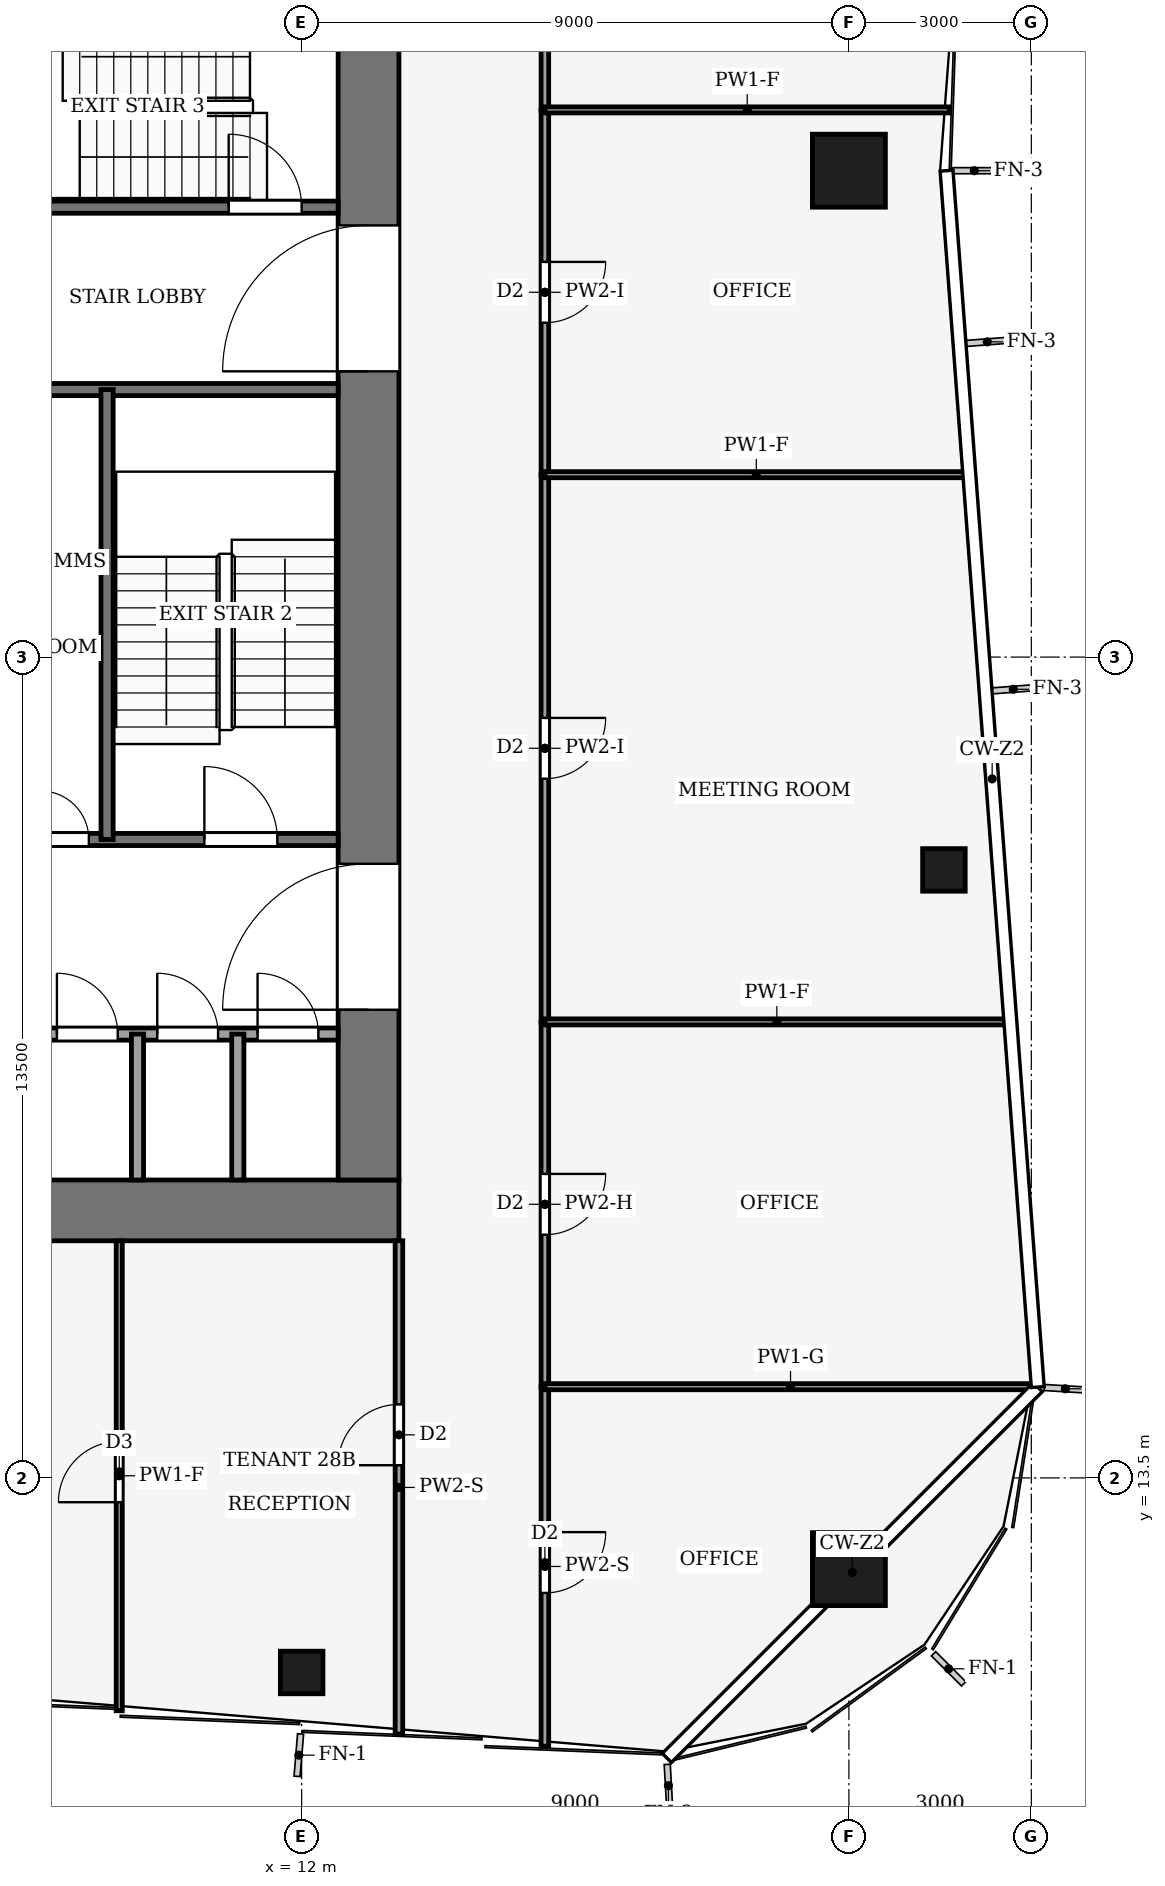
"""IFC4 building model, lengths in metres.
Left out: names, types, materials, properties, quantities, classifications, styles, units other than length and angle.
Written with IfcOpenShell. Run it as: python <this file> out.ifc"""

import sys

from ifc_helpers import new_model, si_unit, direction, frame, frame_2d, origin, origin_2d, place, context, subcontext, project, spatial, rectangle, hollow_rectangle, extrude, element, fill, save


model = new_model("IFC4")
c1 = context("Model", 3, precision=1e-05, world=origin(), true_north=direction((0.0, 1.0)))
c2 = subcontext(c1, "Body", "Model", "MODEL_VIEW")
j1 = project(units=[si_unit("LENGTHUNIT", "METRE"), si_unit("PLANEANGLEUNIT", "RADIAN")], contexts=[c1])
p1 = place(None, origin())
s1 = spatial("IfcSite", under=j1, at=p1, CompositionType="ELEMENT")
p2 = place(p1, origin())
s2 = spatial("IfcBuilding", under=s1, at=p2, CompositionType="ELEMENT")
p3 = place(p2, frame((0.0, 0.0, 126.0)))
s3 = spatial("IfcBuildingStorey", under=s2, at=p3, CompositionType="ELEMENT", Elevation=126.0)
p4 = place(p3, frame((-13.6, 17.9, -0.13), z_axis=(0.0, 0.0, 1.0), x_axis=(1.0, 0.0, 0.0)))
e1 = element("IfcWall", 1, at=p4, inside=s3, PredefinedType="SHEAR", context=c2, shape_type="SweptSolid", body=[
    extrude(rectangle(XDim=27.2, YDim=1.0, at=frame_2d((13.6, 0.0))), origin(), (0.0, 0.0, 1.0), 4.0),
])
p5 = place(p3, frame((13.1, 18.4, -0.13), z_axis=(0.0, 0.0, 1.0), x_axis=(0.0, 1.0, 0.0)))
e2 = element("IfcWall", 2, at=p5, inside=s3, PredefinedType="SHEAR", context=c2, shape_type="SweptSolid", body=[
    extrude(rectangle(XDim=19.2, YDim=1.0, at=frame_2d((9.6, 0.0))), origin(), (0.0, 0.0, 1.0), 4.0),
])
p6 = place(p5, frame((2.8, 0.0, 0.13)))
e3 = element("IfcOpeningElement", 3, at=p6, cuts=e2, PredefinedType="OPENING", context=c2, shape_type="SweptSolid", body=[
    extrude(rectangle(XDim=2.4, YDim=2.4, at=frame_2d((1.2, 1.2))), frame((0.0, 0.51, 0.0), z_axis=(0.0, -1.0, 0.0), x_axis=(1.0, 0.0, 0.0)), (0.0, 0.0, 1.0), 1.02),
])
p7 = place(p5, frame((13.3, 0.0, 0.13)))
e4 = element("IfcOpeningElement", 4, at=p7, cuts=e2, PredefinedType="OPENING", context=c2, shape_type="SweptSolid", body=[
    extrude(rectangle(XDim=2.4, YDim=2.4, at=frame_2d((1.2, 1.2))), frame((0.0, 0.51, 0.0), z_axis=(0.0, -1.0, 0.0), x_axis=(1.0, 0.0, 0.0)), (0.0, 0.0, 1.0), 1.02),
])
for number, where, z_axis, x_axis in (
    (5, (21.0, 35.0, 0.0), (0.0, 0.0, 1.0), (1.0, 0.0, 0.0)),
    (6, (21.0, 12.0, 0.0), (0.0, 0.0, 1.0), (1.0, 0.0, 0.0)),
):
    element("IfcColumn", number, at=place(p3, frame(where, z_axis=z_axis, x_axis=x_axis)), inside=s3, PredefinedType="COLUMN", context=c2, shape_type="SweptSolid", body=[
        extrude(hollow_rectangle(XDim=1.2, YDim=1.2, WallThickness=0.07, at=origin_2d()), origin(), (0.0, 0.0, 1.0), 4.0),
    ])
for number, where, z_axis, x_axis in (
    (7, (12.0, 10.3, 0.0), (0.0, 0.0, 1.0), (1.0, 0.0, 0.0)),
    (8, (22.562, 23.5, 0.0), (0.0, 0.0, 1.0), (1.0, 0.0, 0.0)),
):
    element("IfcColumn", number, at=place(p3, frame(where, z_axis=z_axis, x_axis=x_axis)), inside=s3, PredefinedType="COLUMN", context=c2, shape_type="SweptSolid", body=[
        extrude(hollow_rectangle(XDim=0.7, YDim=0.7, WallThickness=0.03, at=origin_2d()), origin(), (0.0, 0.0, 1.0), 4.0),
    ])
p8 = place(p3, frame((6.0, 20.8, 0.0), z_axis=(0.0, 0.0, 1.0), x_axis=(1.0, 0.0, 0.0)))
e9 = element("IfcWall", 9, at=p8, inside=s3, PredefinedType="PARTITIONING", context=c2, shape_type="SweptSolid", body=[
    extrude(rectangle(XDim=6.6, YDim=0.2, at=frame_2d((3.3, 0.0))), origin(), (0.0, 0.0, 1.0), 3.87),
])
p9 = place(p8, frame((0.325, 0.0, 0.0)))
e10 = element("IfcOpeningElement", 10, at=p9, cuts=e9, PredefinedType="OPENING", context=c2, shape_type="SweptSolid", body=[
    extrude(rectangle(XDim=1.0, YDim=2.1, at=frame_2d((0.5, 1.05))), frame((0.0, 0.11, 0.0), z_axis=(0.0, -1.0, 0.0), x_axis=(1.0, 0.0, 0.0)), (0.0, 0.0, 1.0), 0.22),
])
p10 = place(p8, frame((1.975, 0.0, 0.0)))
e11 = element("IfcOpeningElement", 11, at=p10, cuts=e9, PredefinedType="OPENING", context=c2, shape_type="SweptSolid", body=[
    extrude(rectangle(XDim=1.0, YDim=2.1, at=frame_2d((0.5, 1.05))), frame((0.0, 0.11, 0.0), z_axis=(0.0, -1.0, 0.0), x_axis=(1.0, 0.0, 0.0)), (0.0, 0.0, 1.0), 0.22),
])
p11 = place(p8, frame((3.625, 0.0, 0.0)))
e12 = element("IfcOpeningElement", 12, at=p11, cuts=e9, PredefinedType="OPENING", context=c2, shape_type="SweptSolid", body=[
    extrude(rectangle(XDim=1.0, YDim=2.1, at=frame_2d((0.5, 1.05))), frame((0.0, 0.11, 0.0), z_axis=(0.0, -1.0, 0.0), x_axis=(1.0, 0.0, 0.0)), (0.0, 0.0, 1.0), 0.22),
])
p12 = place(p8, frame((5.275, 0.0, 0.0)))
e13 = element("IfcOpeningElement", 13, at=p12, cuts=e9, PredefinedType="OPENING", context=c2, shape_type="SweptSolid", body=[
    extrude(rectangle(XDim=1.0, YDim=2.1, at=frame_2d((0.5, 1.05))), frame((0.0, 0.11, 0.0), z_axis=(0.0, -1.0, 0.0), x_axis=(1.0, 0.0, 0.0)), (0.0, 0.0, 1.0), 0.22),
])
p13 = place(p3, frame((6.0, 24.0, 0.0), z_axis=(0.0, 0.0, 1.0), x_axis=(1.0, 0.0, 0.0)))
e14 = element("IfcWall", 14, at=p13, inside=s3, PredefinedType="PARTITIONING", context=c2, shape_type="SweptSolid", body=[
    extrude(rectangle(XDim=6.6, YDim=0.2, at=frame_2d((3.3, 0.0))), origin(), (0.0, 0.0, 1.0), 3.87),
])
p14 = place(p13, frame((0.3, 0.0, 0.0)))
e15 = element("IfcOpeningElement", 15, at=p14, cuts=e14, PredefinedType="OPENING", context=c2, shape_type="SweptSolid", body=[
    extrude(rectangle(XDim=0.8, YDim=2.1, at=frame_2d((0.4, 1.05))), frame((0.0, 0.11, 0.0), z_axis=(0.0, -1.0, 0.0), x_axis=(1.0, 0.0, 0.0)), (0.0, 0.0, 1.0), 0.22),
])
p15 = place(p13, frame((1.7, 0.0, 0.0)))
e16 = element("IfcOpeningElement", 16, at=p15, cuts=e14, PredefinedType="OPENING", context=c2, shape_type="SweptSolid", body=[
    extrude(rectangle(XDim=0.8, YDim=2.1, at=frame_2d((0.4, 1.05))), frame((0.0, 0.11, 0.0), z_axis=(0.0, -1.0, 0.0), x_axis=(1.0, 0.0, 0.0)), (0.0, 0.0, 1.0), 0.22),
])
p16 = place(p13, frame((4.4, 0.0, 0.0)))
e17 = element("IfcOpeningElement", 17, at=p16, cuts=e14, PredefinedType="OPENING", context=c2, shape_type="SweptSolid", body=[
    extrude(rectangle(XDim=1.2, YDim=2.2, at=frame_2d((0.6, 1.1))), frame((0.0, 0.11, 0.0), z_axis=(0.0, -1.0, 0.0), x_axis=(1.0, 0.0, 0.0)), (0.0, 0.0, 1.0), 0.22),
])
p17 = place(p3, frame((6.0, 31.4, 0.0), z_axis=(0.0, 0.0, 1.0), x_axis=(1.0, 0.0, 0.0)))
e18 = element("IfcWall", 18, at=p17, inside=s3, PredefinedType="PARTITIONING", context=c2, shape_type="SweptSolid", body=[
    extrude(rectangle(XDim=6.6, YDim=0.2, at=frame_2d((3.3, 0.0))), origin(), (0.0, 0.0, 1.0), 3.87),
])
p18 = place(p3, frame((6.0, 34.4, 0.0), z_axis=(0.0, 0.0, 1.0), x_axis=(1.0, 0.0, 0.0)))
e19 = element("IfcWall", 19, at=p18, inside=s3, PredefinedType="PARTITIONING", context=c2, shape_type="SweptSolid", body=[
    extrude(rectangle(XDim=6.6, YDim=0.2, at=frame_2d((3.3, 0.0))), origin(), (0.0, 0.0, 1.0), 3.87),
])
p19 = place(p18, frame((4.8, 0.0, 0.0)))
e20 = element("IfcOpeningElement", 20, at=p19, cuts=e19, PredefinedType="OPENING", context=c2, shape_type="SweptSolid", body=[
    extrude(rectangle(XDim=1.2, YDim=2.2, at=frame_2d((0.6, 1.1))), frame((0.0, 0.11, 0.0), z_axis=(0.0, -1.0, 0.0), x_axis=(1.0, 0.0, 0.0)), (0.0, 0.0, 1.0), 0.22),
])
p20 = place(p3, frame((8.8, 24.0, 0.0), z_axis=(0.0, 0.0, 1.0), x_axis=(0.0, 1.0, 0.0)))
e21 = element("IfcWall", 21, at=p20, inside=s3, PredefinedType="PARTITIONING", context=c2, shape_type="SweptSolid", body=[
    extrude(rectangle(XDim=7.4, YDim=0.2, at=frame_2d((3.7, 0.0))), origin(), (0.0, 0.0, 1.0), 3.87),
])
for number, where, z_axis, x_axis in (
    (22, (9.3, 18.4, 0.0), (0.0, 0.0, 1.0), (0.0, 1.0, 0.0)),
    (23, (10.95, 18.4, 0.0), (0.0, 0.0, 1.0), (0.0, 1.0, 0.0)),
):
    element("IfcWall", number, at=place(p3, frame(where, z_axis=z_axis, x_axis=x_axis)), inside=s3, PredefinedType="PARTITIONING", context=c2, shape_type="SweptSolid", body=[
        extrude(rectangle(XDim=2.4, YDim=0.2, at=frame_2d((1.2, 0.0))), origin(), (0.0, 0.0, 1.0), 3.87),
    ])
p21 = place(p3, frame((16.0, 15.0, 0.0), z_axis=(0.0, 0.0, 1.0), x_axis=(0.0, -1.0, 0.0)))
e24 = element("IfcWall", 24, at=p21, inside=s3, PredefinedType="PARTITIONING", context=c2, shape_type="SweptSolid", body=[
    extrude(rectangle(XDim=5.913, YDim=0.125, at=frame_2d((2.957, 0.0))), origin(), (0.0, 0.0, 1.0), 3.04),
])
p22 = place(p21, frame((2.392, 0.0, 0.0)))
e25 = element("IfcOpeningElement", 25, at=p22, cuts=e24, PredefinedType="OPENING", context=c2, shape_type="SweptSolid", body=[
    extrude(rectangle(XDim=1.0, YDim=2.1, at=frame_2d((0.5, 1.05))), frame((0.0, 0.073, 0.0), z_axis=(0.0, -1.0, 0.0), x_axis=(1.0, 0.0, 0.0)), (0.0, 0.0, 1.0), 0.145),
])
p23 = place(p3, frame((16.0, 21.0, 0.0), z_axis=(0.0, 0.0, 1.0), x_axis=(0.0, -1.0, 0.0)))
e26 = element("IfcWall", 26, at=p23, inside=s3, PredefinedType="PARTITIONING", context=c2, shape_type="SweptSolid", body=[
    extrude(rectangle(XDim=6.0, YDim=0.125, at=frame_2d((3.0, 0.0))), origin(), (0.0, 0.0, 1.0), 3.14),
])
p24 = place(p23, frame((2.5, 0.0, 0.0)))
e27 = element("IfcOpeningElement", 27, at=p24, cuts=e26, PredefinedType="OPENING", context=c2, shape_type="SweptSolid", body=[
    extrude(rectangle(XDim=1.0, YDim=2.1, at=frame_2d((0.5, 1.05))), frame((0.0, 0.073, 0.0), z_axis=(0.0, -1.0, 0.0), x_axis=(1.0, 0.0, 0.0)), (0.0, 0.0, 1.0), 0.145),
])
p25 = place(p3, frame((16.0, 30.0, 0.0), z_axis=(0.0, 0.0, 1.0), x_axis=(0.0, -1.0, 0.0)))
e28 = element("IfcWall", 28, at=p25, inside=s3, PredefinedType="PARTITIONING", context=c2, shape_type="SweptSolid", body=[
    extrude(rectangle(XDim=9.0, YDim=0.125, at=frame_2d((4.5, 0.0))), origin(), (0.0, 0.0, 1.0), 3.48),
])
p26 = place(p25, frame((4.0, 0.0, 0.0)))
e29 = element("IfcOpeningElement", 29, at=p26, cuts=e28, PredefinedType="OPENING", context=c2, shape_type="SweptSolid", body=[
    extrude(rectangle(XDim=1.0, YDim=2.1, at=frame_2d((0.5, 1.05))), frame((0.0, 0.073, 0.0), z_axis=(0.0, -1.0, 0.0), x_axis=(1.0, 0.0, 0.0)), (0.0, 0.0, 1.0), 0.145),
])
p27 = place(p3, frame((16.0, 36.0, 0.0), z_axis=(0.0, 0.0, 1.0), x_axis=(0.0, -1.0, 0.0)))
e30 = element("IfcWall", 30, at=p27, inside=s3, PredefinedType="PARTITIONING", context=c2, shape_type="SweptSolid", body=[
    extrude(rectangle(XDim=6.0, YDim=0.125, at=frame_2d((3.0, 0.0))), origin(), (0.0, 0.0, 1.0), 3.48),
])
p28 = place(p27, frame((2.5, 0.0, 0.0)))
e31 = element("IfcOpeningElement", 31, at=p28, cuts=e30, PredefinedType="OPENING", context=c2, shape_type="SweptSolid", body=[
    extrude(rectangle(XDim=1.0, YDim=2.1, at=frame_2d((0.5, 1.05))), frame((0.0, 0.073, 0.0), z_axis=(0.0, -1.0, 0.0), x_axis=(1.0, 0.0, 0.0)), (0.0, 0.0, 1.0), 0.145),
])
p29 = place(p3, frame((16.0, 41.004, 0.0), z_axis=(0.0, 0.0, 1.0), x_axis=(0.0, -1.0, 0.0)))
e32 = element("IfcWall", 32, at=p29, inside=s3, PredefinedType="PARTITIONING", context=c2, shape_type="SweptSolid", body=[
    extrude(rectangle(XDim=5.004, YDim=0.125, at=frame_2d((2.502, 0.0))), origin(), (0.0, 0.0, 1.0), 3.14),
])
p30 = place(p29, frame((2.002, 0.0, 0.0)))
e33 = element("IfcOpeningElement", 33, at=p30, cuts=e32, PredefinedType="OPENING", context=c2, shape_type="SweptSolid", body=[
    extrude(rectangle(XDim=1.0, YDim=2.1, at=frame_2d((0.5, 1.05))), frame((0.0, 0.073, 0.0), z_axis=(0.0, -1.0, 0.0), x_axis=(1.0, 0.0, 0.0)), (0.0, 0.0, 1.0), 0.145),
])
p31 = place(p3, frame((13.6, 9.287, 0.0), z_axis=(0.0, 0.0, 1.0), x_axis=(0.0, 1.0, 0.0)))
e34 = element("IfcWall", 34, at=p31, inside=s3, PredefinedType="PARTITIONING", context=c2, shape_type="SweptSolid", body=[
    extrude(rectangle(XDim=8.113, YDim=0.125, at=frame_2d((4.057, 0.0))), origin(), (0.0, 0.0, 1.0), 3.04),
])
p32 = place(p31, frame((4.422, 0.0, 0.0)))
e35 = element("IfcOpeningElement", 35, at=p32, cuts=e34, PredefinedType="OPENING", context=c2, shape_type="SweptSolid", body=[
    extrude(rectangle(XDim=1.0, YDim=2.1, at=frame_2d((0.5, 1.05))), frame((0.0, 0.073, 0.0), z_axis=(0.0, -1.0, 0.0), x_axis=(1.0, 0.0, 0.0)), (0.0, 0.0, 1.0), 0.145),
])
p33 = place(p3, frame((24.08, 15.0, 0.0), z_axis=(0.0, 0.0, 1.0), x_axis=(-1.0, 0.0, 0.0)))
e36 = element("IfcWall", 36, at=p33, inside=s3, PredefinedType="PARTITIONING", context=c2, shape_type="SweptSolid", body=[
    extrude(rectangle(XDim=8.08, YDim=0.1, at=frame_2d((4.04, 0.0))), origin(), (0.0, 0.0, 1.0), 2.93),
])
p34 = place(p3, frame((23.63, 21.0, 0.0), z_axis=(0.0, 0.0, 1.0), x_axis=(-1.0, 0.0, 0.0)))
e37 = element("IfcWall", 37, at=p34, inside=s3, PredefinedType="PARTITIONING", context=c2, shape_type="SweptSolid", body=[
    extrude(rectangle(XDim=7.63, YDim=0.1, at=frame_2d((3.815, 0.0))), origin(), (0.0, 0.0, 1.0), 3.04),
])
p35 = place(p3, frame((22.955, 30.0, 0.0), z_axis=(0.0, 0.0, 1.0), x_axis=(-1.0, 0.0, 0.0)))
e38 = element("IfcWall", 38, at=p35, inside=s3, PredefinedType="PARTITIONING", context=c2, shape_type="SweptSolid", body=[
    extrude(rectangle(XDim=6.955, YDim=0.1, at=frame_2d((3.478, 0.0))), origin(), (0.0, 0.0, 1.0), 3.04),
])
p36 = place(p3, frame((22.655, 36.0, 0.0), z_axis=(0.0, 0.0, 1.0), x_axis=(-1.0, 0.0, 0.0)))
e39 = element("IfcWall", 39, at=p36, inside=s3, PredefinedType="PARTITIONING", context=c2, shape_type="SweptSolid", body=[
    extrude(rectangle(XDim=6.655, YDim=0.1, at=frame_2d((3.328, 0.0))), origin(), (0.0, 0.0, 1.0), 3.04),
])
p37 = place(p3, frame((9.0, 9.67, 0.0), z_axis=(0.0, 0.0, 1.0), x_axis=(0.0, 1.0, 0.0)))
e40 = element("IfcWall", 40, at=p37, inside=s3, PredefinedType="PARTITIONING", context=c2, shape_type="SweptSolid", body=[
    extrude(rectangle(XDim=7.73, YDim=0.1, at=frame_2d((3.865, 0.0))), origin(), (0.0, 0.0, 1.0), 3.04),
])
p38 = place(p37, frame((3.43, 0.0, 0.0)))
e41 = element("IfcOpeningElement", 41, at=p38, cuts=e40, PredefinedType="OPENING", context=c2, shape_type="SweptSolid", body=[
    extrude(rectangle(XDim=1.0, YDim=2.1, at=frame_2d((0.5, 1.05))), frame((0.0, 0.06, 0.0), z_axis=(0.0, -1.0, 0.0), x_axis=(1.0, 0.0, 0.0)), (0.0, 0.0, 1.0), 0.12),
])
p39 = place(p10, origin())
e42 = element("IfcDoor", 42, at=p39, inside=s3, OperationType="SINGLE_SWING_LEFT", PredefinedType="DOOR", context=c2, shape_type="SweptSolid", body=[
    extrude(rectangle(XDim=1.0, YDim=2.1, at=frame_2d((0.5, 1.05))), frame((0.0, 0.025, 0.0), z_axis=(0.0, -1.0, 0.0), x_axis=(1.0, 0.0, 0.0)), (0.0, 0.0, 1.0), 0.05),
])
fill(e11, e42)
p40 = place(p11, origin())
e43 = element("IfcDoor", 43, at=p40, inside=s3, OperationType="SINGLE_SWING_RIGHT", PredefinedType="DOOR", context=c2, shape_type="SweptSolid", body=[
    extrude(rectangle(XDim=1.0, YDim=2.1, at=frame_2d((0.5, 1.05))), frame((0.0, 0.025, 0.0), z_axis=(0.0, -1.0, 0.0), x_axis=(1.0, 0.0, 0.0)), (0.0, 0.0, 1.0), 0.05),
])
fill(e12, e43)
p41 = place(p12, origin())
e44 = element("IfcDoor", 44, at=p41, inside=s3, OperationType="SINGLE_SWING_RIGHT", PredefinedType="DOOR", context=c2, shape_type="SweptSolid", body=[
    extrude(rectangle(XDim=1.0, YDim=2.1, at=frame_2d((0.5, 1.05))), frame((0.0, 0.025, 0.0), z_axis=(0.0, -1.0, 0.0), x_axis=(1.0, 0.0, 0.0)), (0.0, 0.0, 1.0), 0.05),
])
fill(e13, e44)
p42 = place(p15, origin())
e45 = element("IfcDoor", 45, at=p42, inside=s3, OperationType="SINGLE_SWING_RIGHT", PredefinedType="DOOR", context=c2, shape_type="SweptSolid", body=[
    extrude(rectangle(XDim=0.8, YDim=2.1, at=frame_2d((0.4, 1.05))), frame((0.0, 0.025, 0.0), z_axis=(0.0, -1.0, 0.0), x_axis=(1.0, 0.0, 0.0)), (0.0, 0.0, 1.0), 0.05),
])
fill(e16, e45)
p43 = place(p16, origin())
e46 = element("IfcDoor", 46, at=p43, inside=s3, OperationType="SINGLE_SWING_LEFT", PredefinedType="DOOR", context=c2, shape_type="SweptSolid", body=[
    extrude(rectangle(XDim=1.2, YDim=2.2, at=frame_2d((0.6, 1.1))), frame((0.0, 0.025, 0.0), z_axis=(0.0, -1.0, 0.0), x_axis=(1.0, 0.0, 0.0)), (0.0, 0.0, 1.0), 0.05),
])
fill(e17, e46)
p44 = place(p19, origin())
e47 = element("IfcDoor", 47, at=p44, inside=s3, OperationType="SINGLE_SWING_RIGHT", PredefinedType="DOOR", context=c2, shape_type="SweptSolid", body=[
    extrude(rectangle(XDim=1.2, YDim=2.2, at=frame_2d((0.6, 1.1))), frame((0.0, 0.025, 0.0), z_axis=(0.0, -1.0, 0.0), x_axis=(1.0, 0.0, 0.0)), (0.0, 0.0, 1.0), 0.05),
])
fill(e20, e47)
p45 = place(p6, origin())
e48 = element("IfcDoor", 48, at=p45, inside=s3, OperationType="DOUBLE_DOOR_SINGLE_SWING", PredefinedType="DOOR", context=c2, shape_type="SweptSolid", body=[
    extrude(rectangle(XDim=2.4, YDim=2.4, at=frame_2d((1.2, 1.2))), frame((0.0, 0.025, 0.0), z_axis=(0.0, -1.0, 0.0), x_axis=(1.0, 0.0, 0.0)), (0.0, 0.0, 1.0), 0.05),
])
fill(e3, e48)
p46 = place(p7, origin())
e49 = element("IfcDoor", 49, at=p46, inside=s3, OperationType="DOUBLE_DOOR_SINGLE_SWING", PredefinedType="DOOR", context=c2, shape_type="SweptSolid", body=[
    extrude(rectangle(XDim=2.4, YDim=2.4, at=frame_2d((1.2, 1.2))), frame((0.0, 0.025, 0.0), z_axis=(0.0, -1.0, 0.0), x_axis=(1.0, 0.0, 0.0)), (0.0, 0.0, 1.0), 0.05),
])
fill(e4, e49)
p47 = place(p22, origin())
e50 = element("IfcDoor", 50, at=p47, inside=s3, OperationType="SINGLE_SWING_LEFT", PredefinedType="DOOR", context=c2, shape_type="SweptSolid", body=[
    extrude(rectangle(XDim=1.0, YDim=2.1, at=frame_2d((0.5, 1.05))), frame((0.0, 0.025, 0.0), z_axis=(0.0, -1.0, 0.0), x_axis=(1.0, 0.0, 0.0)), (0.0, 0.0, 1.0), 0.05),
])
fill(e25, e50)
p48 = place(p24, origin())
e51 = element("IfcDoor", 51, at=p48, inside=s3, OperationType="SINGLE_SWING_RIGHT", PredefinedType="DOOR", context=c2, shape_type="SweptSolid", body=[
    extrude(rectangle(XDim=1.0, YDim=2.1, at=frame_2d((0.5, 1.05))), frame((0.0, 0.025, 0.0), z_axis=(0.0, -1.0, 0.0), x_axis=(1.0, 0.0, 0.0)), (0.0, 0.0, 1.0), 0.05),
])
fill(e27, e51)
p49 = place(p26, origin())
e52 = element("IfcDoor", 52, at=p49, inside=s3, OperationType="SINGLE_SWING_LEFT", PredefinedType="DOOR", context=c2, shape_type="SweptSolid", body=[
    extrude(rectangle(XDim=1.0, YDim=2.1, at=frame_2d((0.5, 1.05))), frame((0.0, 0.025, 0.0), z_axis=(0.0, -1.0, 0.0), x_axis=(1.0, 0.0, 0.0)), (0.0, 0.0, 1.0), 0.05),
])
fill(e29, e52)
p50 = place(p28, origin())
e53 = element("IfcDoor", 53, at=p50, inside=s3, OperationType="SINGLE_SWING_RIGHT", PredefinedType="DOOR", context=c2, shape_type="SweptSolid", body=[
    extrude(rectangle(XDim=1.0, YDim=2.1, at=frame_2d((0.5, 1.05))), frame((0.0, 0.025, 0.0), z_axis=(0.0, -1.0, 0.0), x_axis=(1.0, 0.0, 0.0)), (0.0, 0.0, 1.0), 0.05),
])
fill(e31, e53)
p51 = place(p32, origin())
e54 = element("IfcDoor", 54, at=p51, inside=s3, OperationType="SINGLE_SWING_RIGHT", PredefinedType="DOOR", context=c2, shape_type="SweptSolid", body=[
    extrude(rectangle(XDim=1.0, YDim=2.1, at=frame_2d((0.5, 1.05))), frame((0.0, 0.025, 0.0), z_axis=(0.0, -1.0, 0.0), x_axis=(1.0, 0.0, 0.0)), (0.0, 0.0, 1.0), 0.05),
])
fill(e35, e54)
p52 = place(p38, origin())
e55 = element("IfcDoor", 55, at=p52, inside=s3, OperationType="SINGLE_SWING_RIGHT", PredefinedType="DOOR", context=c2, shape_type="SweptSolid", body=[
    extrude(rectangle(XDim=1.0, YDim=2.1, at=frame_2d((0.5, 1.05))), frame((0.0, 0.025, 0.0), z_axis=(0.0, -1.0, 0.0), x_axis=(1.0, 0.0, 0.0)), (0.0, 0.0, 1.0), 0.05),
])
fill(e41, e55)
save(model, sys.argv[1])
